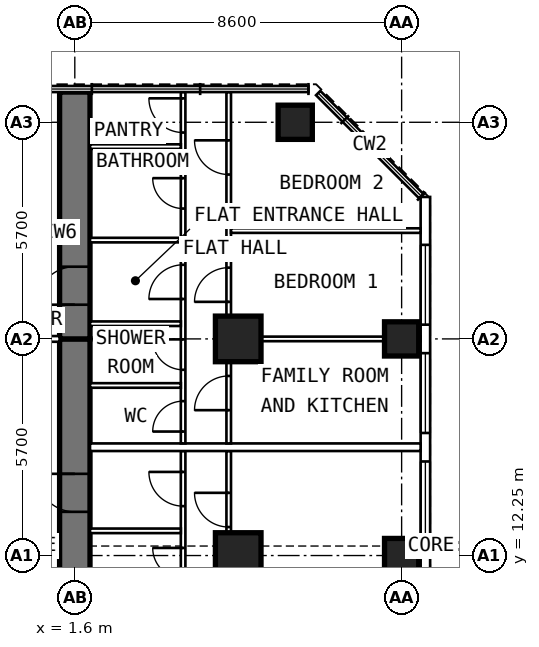
"""IFC4 building model, lengths in metres.
Left out: names, types, materials, properties, quantities, classifications, styles, units other than length and angle.
Written with IfcOpenShell. Run it as: python <this file> out.ifc"""

import sys

from ifc_helpers import new_model, si_unit, direction, frame, frame_2d, origin, origin_2d, place, context, subcontext, project, spatial, rectangle, extrude, element, fill, save


model = new_model("IFC4")
c1 = context("Model", 3, precision=1e-05, world=origin(), true_north=direction((0.0, 1.0)))
c2 = subcontext(c1, "Body", "Model", "MODEL_VIEW")
j1 = project(units=[si_unit("LENGTHUNIT", "METRE"), si_unit("PLANEANGLEUNIT", "RADIAN")], contexts=[c1])
p1 = place(None, origin())
s1 = spatial("IfcSite", under=j1, at=p1, CompositionType="ELEMENT")
p2 = place(p1, origin())
s2 = spatial("IfcBuilding", under=s1, at=p2, CompositionType="ELEMENT")
p3 = place(p2, frame((0.0, 0.0, 145.4)))
s3 = spatial("IfcBuildingStorey", under=s2, at=p3, CompositionType="ELEMENT", Elevation=145.4)
for number, where, z_axis, x_axis in (
    (1, (10.2, 12.25, 0.0), (0.0, 0.0, 1.0), (0.0, 1.0, 0.0)),
    (2, (10.2, 17.95, 0.0), (0.0, 0.0, 1.0), (0.0, 1.0, 0.0)),
    (3, (7.4, 23.65, 0.0), (0.0, 0.0, 1.0), (0.0, 1.0, 0.0)),
):
    element("IfcColumn", number, at=place(p3, frame(where, z_axis=z_axis, x_axis=x_axis)), inside=s3, PredefinedType="COLUMN", context=c2, shape_type="SweptSolid", body=[
        extrude(rectangle(XDim=0.9, YDim=0.9, at=origin_2d()), origin(), (0.0, 0.0, 1.0), 3.6),
    ])
for number, where, z_axis, x_axis in (
    (4, (5.9, 12.25, 0.0), (0.0, 0.0, 1.0), (0.0, 1.0, 0.0)),
    (5, (5.9, 17.95, 0.0), (0.0, 0.0, 1.0), (0.0, 1.0, 0.0)),
):
    element("IfcColumn", number, at=place(p3, frame(where, z_axis=z_axis, x_axis=x_axis)), inside=s3, PredefinedType="COLUMN", context=c2, shape_type="SweptSolid", body=[
        extrude(rectangle(XDim=1.2, YDim=1.2, at=origin_2d()), origin(), (0.0, 0.0, 1.0), 3.6),
    ])
p4 = place(p3, frame((1.6, 9.6, 0.0), z_axis=(0.0, 0.0, 1.0), x_axis=(0.0, 1.0, 0.0)))
e6 = element("IfcWall", 6, at=p4, inside=s3, PredefinedType="SHEAR", context=c2, shape_type="SweptSolid", body=[
    extrude(rectangle(XDim=8.35, YDim=0.8, at=frame_2d((4.175, 0.0))), origin(), (0.0, 0.0, 1.0), 3.6),
])
p5 = place(p4, frame((3.8, 0.0, 0.0)))
e7 = element("IfcOpeningElement", 7, at=p5, cuts=e6, PredefinedType="OPENING", context=c2, shape_type="SweptSolid", body=[
    extrude(rectangle(XDim=1.0, YDim=2.1, at=frame_2d((0.5, 1.05))), frame((0.0, 0.412, 0.0), z_axis=(0.0, -1.0, 0.0), x_axis=(1.0, 0.0, 0.0)), (0.0, 0.0, 1.0), 0.824),
])
p6 = place(p3, frame((1.6, 17.95, 0.0), z_axis=(0.0, 0.0, 1.0), x_axis=(0.0, 1.0, 0.0)))
e8 = element("IfcWall", 8, at=p6, inside=s3, PredefinedType="SHEAR", context=c2, shape_type="SweptSolid", body=[
    extrude(rectangle(XDim=6.495, YDim=0.8, at=frame_2d((3.248, 0.0))), origin(), (0.0, 0.0, 1.0), 3.6),
])
p7 = place(p6, frame((0.9, 0.0, 0.0)))
e9 = element("IfcOpeningElement", 9, at=p7, cuts=e8, PredefinedType="OPENING", context=c2, shape_type="SweptSolid", body=[
    extrude(rectangle(XDim=1.0, YDim=2.1, at=frame_2d((0.5, 1.05))), frame((0.0, 0.412, 0.0), z_axis=(0.0, -1.0, 0.0), x_axis=(1.0, 0.0, 0.0)), (0.0, 0.0, 1.0), 0.824),
])
p8 = place(p3, frame((10.825, 6.409, 0.0), z_axis=(0.0, 0.0, 1.0), x_axis=(0.0, 1.0, 0.0)))
e10 = element("IfcWall", 10, at=p8, inside=s3, PredefinedType="SOLIDWALL", context=c2, shape_type="SweptSolid", body=[
    extrude(rectangle(XDim=15.276, YDim=0.25, at=frame_2d((7.638, 0.0))), origin(), (0.0, 0.0, 1.0), 3.35),
])
p9 = place(p8, frame((0.516, 0.0, 0.8)))
e11 = element("IfcOpeningElement", 11, at=p9, cuts=e10, PredefinedType="OPENING", context=c2, shape_type="SweptSolid", body=[
    extrude(rectangle(XDim=2.1, YDim=1.8, at=frame_2d((1.05, 0.9))), frame((0.0, 0.137, 0.0), z_axis=(0.0, -1.0, 0.0), x_axis=(1.0, 0.0, 0.0)), (0.0, 0.0, 1.0), 0.274),
])
p10 = place(p8, frame((3.366, 0.0, 0.8)))
e12 = element("IfcOpeningElement", 12, at=p10, cuts=e10, PredefinedType="OPENING", context=c2, shape_type="SweptSolid", body=[
    extrude(rectangle(XDim=2.1, YDim=1.8, at=frame_2d((1.05, 0.9))), frame((0.0, 0.137, 0.0), z_axis=(0.0, -1.0, 0.0), x_axis=(1.0, 0.0, 0.0)), (0.0, 0.0, 1.0), 0.274),
])
p11 = place(p8, frame((6.216, 0.0, 0.8)))
e13 = element("IfcOpeningElement", 13, at=p11, cuts=e10, PredefinedType="OPENING", context=c2, shape_type="SweptSolid", body=[
    extrude(rectangle(XDim=2.1, YDim=1.8, at=frame_2d((1.05, 0.9))), frame((0.0, 0.137, 0.0), z_axis=(0.0, -1.0, 0.0), x_axis=(1.0, 0.0, 0.0)), (0.0, 0.0, 1.0), 0.274),
])
p12 = place(p8, frame((9.066, 0.0, 0.8)))
e14 = element("IfcOpeningElement", 14, at=p12, cuts=e10, PredefinedType="OPENING", context=c2, shape_type="SweptSolid", body=[
    extrude(rectangle(XDim=2.1, YDim=1.8, at=frame_2d((1.05, 0.9))), frame((0.0, 0.137, 0.0), z_axis=(0.0, -1.0, 0.0), x_axis=(1.0, 0.0, 0.0)), (0.0, 0.0, 1.0), 0.274),
])
p13 = place(p8, frame((11.916, 0.0, 0.8)))
e15 = element("IfcOpeningElement", 15, at=p13, cuts=e10, PredefinedType="OPENING", context=c2, shape_type="SweptSolid", body=[
    extrude(rectangle(XDim=2.1, YDim=1.8, at=frame_2d((1.05, 0.9))), frame((0.0, 0.137, 0.0), z_axis=(0.0, -1.0, 0.0), x_axis=(1.0, 0.0, 0.0)), (0.0, 0.0, 1.0), 0.274),
])
p14 = place(p3, frame((4.45, 10.05, 0.0), z_axis=(0.0, 0.0, 1.0), x_axis=(0.0, 1.0, 0.0)))
e16 = element("IfcWall", 16, at=p14, inside=s3, PredefinedType="PARTITIONING", context=c2, shape_type="SweptSolid", body=[
    extrude(rectangle(XDim=4.95, YDim=0.12, at=frame_2d((2.475, 0.0))), origin(), (0.0, 0.0, 1.0), 3.35),
])
p15 = place(p14, frame((1.6, 0.0, 0.0)))
e17 = element("IfcOpeningElement", 17, at=p15, cuts=e16, PredefinedType="OPENING", context=c2, shape_type="SweptSolid", body=[
    extrude(rectangle(XDim=0.8, YDim=2.1, at=frame_2d((0.4, 1.05))), frame((0.0, 0.072, 0.0), z_axis=(0.0, -1.0, 0.0), x_axis=(1.0, 0.0, 0.0)), (0.0, 0.0, 1.0), 0.144),
])
p16 = place(p14, frame((3.5, 0.0, 0.0)))
e18 = element("IfcOpeningElement", 18, at=p16, cuts=e16, PredefinedType="OPENING", context=c2, shape_type="SweptSolid", body=[
    extrude(rectangle(XDim=0.9, YDim=2.1, at=frame_2d((0.45, 1.05))), frame((0.0, 0.072, 0.0), z_axis=(0.0, -1.0, 0.0), x_axis=(1.0, 0.0, 0.0)), (0.0, 0.0, 1.0), 0.144),
])
p17 = place(p3, frame((5.65, 9.6, 0.0), z_axis=(0.0, 0.0, 1.0), x_axis=(0.0, 1.0, 0.0)))
e19 = element("IfcWall", 19, at=p17, inside=s3, PredefinedType="PARTITIONING", context=c2, shape_type="SweptSolid", body=[
    extrude(rectangle(XDim=5.4, YDim=0.12, at=frame_2d((2.7, 0.0))), origin(), (0.0, 0.0, 1.0), 3.35),
])
p18 = place(p17, frame((3.4, 0.0, 0.0)))
e20 = element("IfcOpeningElement", 20, at=p18, cuts=e19, PredefinedType="OPENING", context=c2, shape_type="SweptSolid", body=[
    extrude(rectangle(XDim=0.9, YDim=2.1, at=frame_2d((0.45, 1.05))), frame((0.0, 0.072, 0.0), z_axis=(0.0, -1.0, 0.0), x_axis=(1.0, 0.0, 0.0)), (0.0, 0.0, 1.0), 0.144),
])
p19 = place(p3, frame((2.0, 12.9, 0.0), z_axis=(0.0, 0.0, 1.0), x_axis=(1.0, 0.0, 0.0)))
e21 = element("IfcWall", 21, at=p19, inside=s3, PredefinedType="PARTITIONING", context=c2, shape_type="SweptSolid", body=[
    extrude(rectangle(XDim=2.39, YDim=0.12, at=frame_2d((1.195, 0.0))), origin(), (0.0, 0.0, 1.0), 3.35),
])
p20 = place(p3, frame((4.45, 15.2, 0.0), z_axis=(0.0, 0.0, 1.0), x_axis=(0.0, 1.0, 0.0)))
e22 = element("IfcWall", 22, at=p20, inside=s3, PredefinedType="PARTITIONING", context=c2, shape_type="SweptSolid", body=[
    extrude(rectangle(XDim=9.245, YDim=0.12, at=frame_2d((4.623, 0.0))), origin(), (0.0, 0.0, 1.0), 3.35),
])
p21 = place(p20, frame((0.312, 0.0, 0.0)))
e23 = element("IfcOpeningElement", 23, at=p21, cuts=e22, PredefinedType="OPENING", context=c2, shape_type="SweptSolid", body=[
    extrude(rectangle(XDim=0.8, YDim=2.1, at=frame_2d((0.4, 1.05))), frame((0.0, 0.072, 0.0), z_axis=(0.0, -1.0, 0.0), x_axis=(1.0, 0.0, 0.0)), (0.0, 0.0, 1.0), 0.144),
])
p22 = place(p20, frame((1.938, 0.0, 0.0)))
e24 = element("IfcOpeningElement", 24, at=p22, cuts=e22, PredefinedType="OPENING", context=c2, shape_type="SweptSolid", body=[
    extrude(rectangle(XDim=0.8, YDim=2.1, at=frame_2d((0.4, 1.05))), frame((0.0, 0.072, 0.0), z_axis=(0.0, -1.0, 0.0), x_axis=(1.0, 0.0, 0.0)), (0.0, 0.0, 1.0), 0.144),
])
p23 = place(p20, frame((3.8, 0.0, 0.0)))
e25 = element("IfcOpeningElement", 25, at=p23, cuts=e22, PredefinedType="OPENING", context=c2, shape_type="SweptSolid", body=[
    extrude(rectangle(XDim=0.9, YDim=2.1, at=frame_2d((0.45, 1.05))), frame((0.0, 0.072, 0.0), z_axis=(0.0, -1.0, 0.0), x_axis=(1.0, 0.0, 0.0)), (0.0, 0.0, 1.0), 0.144),
])
p24 = place(p20, frame((6.18, 0.0, 0.0)))
e26 = element("IfcOpeningElement", 26, at=p24, cuts=e22, PredefinedType="OPENING", context=c2, shape_type="SweptSolid", body=[
    extrude(rectangle(XDim=0.8, YDim=2.1, at=frame_2d((0.4, 1.05))), frame((0.0, 0.072, 0.0), z_axis=(0.0, -1.0, 0.0), x_axis=(1.0, 0.0, 0.0)), (0.0, 0.0, 1.0), 0.144),
])
p25 = place(p20, frame((8.18, 0.0, 0.0)))
e27 = element("IfcOpeningElement", 27, at=p25, cuts=e22, PredefinedType="OPENING", context=c2, shape_type="SweptSolid", body=[
    extrude(rectangle(XDim=0.9, YDim=2.1, at=frame_2d((0.45, 1.05))), frame((0.0, 0.072, 0.0), z_axis=(0.0, -1.0, 0.0), x_axis=(1.0, 0.0, 0.0)), (0.0, 0.0, 1.0), 0.144),
])
p26 = place(p3, frame((5.65, 15.2, 0.0), z_axis=(0.0, 0.0, 1.0), x_axis=(0.0, 1.0, 0.0)))
e28 = element("IfcWall", 28, at=p26, inside=s3, PredefinedType="PARTITIONING", context=c2, shape_type="SweptSolid", body=[
    extrude(rectangle(XDim=9.245, YDim=0.12, at=frame_2d((4.623, 0.0))), origin(), (0.0, 0.0, 1.0), 3.35),
])
p27 = place(p26, frame((0.875, 0.0, 0.0)))
e29 = element("IfcOpeningElement", 29, at=p27, cuts=e28, PredefinedType="OPENING", context=c2, shape_type="SweptSolid", body=[
    extrude(rectangle(XDim=0.9, YDim=2.1, at=frame_2d((0.45, 1.05))), frame((0.0, 0.072, 0.0), z_axis=(0.0, -1.0, 0.0), x_axis=(1.0, 0.0, 0.0)), (0.0, 0.0, 1.0), 0.144),
])
p28 = place(p26, frame((3.725, 0.0, 0.0)))
e30 = element("IfcOpeningElement", 30, at=p28, cuts=e28, PredefinedType="OPENING", context=c2, shape_type="SweptSolid", body=[
    extrude(rectangle(XDim=0.9, YDim=2.1, at=frame_2d((0.45, 1.05))), frame((0.0, 0.072, 0.0), z_axis=(0.0, -1.0, 0.0), x_axis=(1.0, 0.0, 0.0)), (0.0, 0.0, 1.0), 0.144),
])
p29 = place(p26, frame((7.075, 0.0, 0.0)))
e31 = element("IfcOpeningElement", 31, at=p29, cuts=e28, PredefinedType="OPENING", context=c2, shape_type="SweptSolid", body=[
    extrude(rectangle(XDim=0.9, YDim=2.1, at=frame_2d((0.45, 1.05))), frame((0.0, 0.072, 0.0), z_axis=(0.0, -1.0, 0.0), x_axis=(1.0, 0.0, 0.0)), (0.0, 0.0, 1.0), 0.144),
])
p30 = place(p3, frame((5.71, 17.95, 0.0), z_axis=(0.0, 0.0, 1.0), x_axis=(1.0, 0.0, 0.0)))
e32 = element("IfcWall", 32, at=p30, inside=s3, PredefinedType="PARTITIONING", context=c2, shape_type="SweptSolid", body=[
    extrude(rectangle(XDim=4.99, YDim=0.12, at=frame_2d((2.495, 0.0))), origin(), (0.0, 0.0, 1.0), 2.45),
])
p31 = place(p3, frame((5.71, 20.8, 0.0), z_axis=(0.0, 0.0, 1.0), x_axis=(1.0, 0.0, 0.0)))
e33 = element("IfcWall", 33, at=p31, inside=s3, PredefinedType="PARTITIONING", context=c2, shape_type="SweptSolid", body=[
    extrude(rectangle(XDim=4.99, YDim=0.12, at=frame_2d((2.495, 0.0))), origin(), (0.0, 0.0, 1.0), 3.35),
])
for number, where, z_axis, x_axis in (
    (34, (2.0, 16.725, 0.0), (0.0, 0.0, 1.0), (1.0, 0.0, 0.0)),
    (35, (2.0, 18.35, 0.0), (0.0, 0.0, 1.0), (1.0, 0.0, 0.0)),
    (36, (2.0, 20.55, 0.0), (0.0, 0.0, 1.0), (1.0, 0.0, 0.0)),
    (37, (2.0, 23.01, 0.0), (0.0, 0.0, 1.0), (1.0, 0.0, 0.0)),
):
    element("IfcWall", number, at=place(p3, frame(where, z_axis=z_axis, x_axis=x_axis)), inside=s3, PredefinedType="PARTITIONING", context=c2, shape_type="SweptSolid", body=[
        extrude(rectangle(XDim=2.39, YDim=0.12, at=frame_2d((1.195, 0.0))), origin(), (0.0, 0.0, 1.0), 3.35),
    ])
p32 = place(p3, frame((2.0, 15.1, 0.0), z_axis=(0.0, 0.0, 1.0), x_axis=(1.0, 0.0, 0.0)))
e38 = element("IfcWall", 38, at=p32, inside=s3, PredefinedType="PARTITIONING", context=c2, shape_type="SweptSolid", body=[
    extrude(rectangle(XDim=8.7, YDim=0.2, at=frame_2d((4.35, 0.0))), origin(), (0.0, 0.0, 1.0), 3.35),
])
p33 = place(p3, frame((1.2, 20.75, 0.0), z_axis=(0.0, 0.0, 1.0), x_axis=(-1.0, 0.0, 0.0)))
e39 = element("IfcWall", 39, at=p33, inside=s3, PredefinedType="PARTITIONING", context=c2, shape_type="SweptSolid", body=[
    extrude(rectangle(XDim=2.4, YDim=0.15, at=frame_2d((1.2, 0.0))), origin(), (0.0, 0.0, 1.0), 3.35),
])
p34 = place(p33, frame((0.7, 0.0, 0.0)))
e40 = element("IfcOpeningElement", 40, at=p34, cuts=e39, PredefinedType="OPENING", context=c2, shape_type="SweptSolid", body=[
    extrude(rectangle(XDim=1.0, YDim=2.1, at=frame_2d((0.5, 1.05))), frame((0.0, 0.087, 0.0), z_axis=(0.0, -1.0, 0.0), x_axis=(1.0, 0.0, 0.0)), (0.0, 0.0, 1.0), 0.174),
])
p35 = place(p3, frame((1.2, 17.95, 0.0), z_axis=(0.0, 0.0, 1.0), x_axis=(-1.0, 0.0, 0.0)))
e41 = element("IfcWall", 41, at=p35, inside=s3, PredefinedType="PARTITIONING", context=c2, shape_type="SweptSolid", body=[
    extrude(rectangle(XDim=2.4, YDim=0.15, at=frame_2d((1.2, 0.0))), origin(), (0.0, 0.0, 1.0), 3.35),
])
p36 = place(p35, frame((0.7, 0.0, 0.0)))
e42 = element("IfcOpeningElement", 42, at=p36, cuts=e41, PredefinedType="OPENING", context=c2, shape_type="SweptSolid", body=[
    extrude(rectangle(XDim=1.0, YDim=2.1, at=frame_2d((0.5, 1.05))), frame((0.0, 0.087, 0.0), z_axis=(0.0, -1.0, 0.0), x_axis=(1.0, 0.0, 0.0)), (0.0, 0.0, 1.0), 0.174),
])
p37 = place(p11, origin())
e43 = element("IfcWindow", 43, at=p37, inside=s3, PartitioningType="SINGLE_PANEL", PredefinedType="WINDOW", context=c2, shape_type="SweptSolid", body=[
    extrude(rectangle(XDim=2.1, YDim=1.8, at=frame_2d((1.05, 0.9))), frame((0.0, 0.03, 0.0), z_axis=(0.0, -1.0, 0.0), x_axis=(1.0, 0.0, 0.0)), (0.0, 0.0, 1.0), 0.06),
])
fill(e13, e43)
p38 = place(p12, origin())
e44 = element("IfcWindow", 44, at=p38, inside=s3, PartitioningType="SINGLE_PANEL", PredefinedType="WINDOW", context=c2, shape_type="SweptSolid", body=[
    extrude(rectangle(XDim=2.1, YDim=1.8, at=frame_2d((1.05, 0.9))), frame((0.0, 0.03, 0.0), z_axis=(0.0, -1.0, 0.0), x_axis=(1.0, 0.0, 0.0)), (0.0, 0.0, 1.0), 0.06),
])
fill(e14, e44)
p39 = place(p13, origin())
e45 = element("IfcWindow", 45, at=p39, inside=s3, PartitioningType="SINGLE_PANEL", PredefinedType="WINDOW", context=c2, shape_type="SweptSolid", body=[
    extrude(rectangle(XDim=2.1, YDim=1.8, at=frame_2d((1.05, 0.9))), frame((0.0, 0.03, 0.0), z_axis=(0.0, -1.0, 0.0), x_axis=(1.0, 0.0, 0.0)), (0.0, 0.0, 1.0), 0.06),
])
fill(e15, e45)
p40 = place(p5, origin())
e46 = element("IfcDoor", 46, at=p40, inside=s3, OperationType="SINGLE_SWING_RIGHT", PredefinedType="DOOR", context=c2, shape_type="SweptSolid", body=[
    extrude(rectangle(XDim=1.0, YDim=2.1, at=frame_2d((0.5, 1.05))), frame((0.0, 0.15, 0.0), z_axis=(0.0, -1.0, 0.0), x_axis=(1.0, 0.0, 0.0)), (0.0, 0.0, 1.0), 0.3),
])
fill(e7, e46)
p41 = place(p18, origin())
e47 = element("IfcDoor", 47, at=p41, inside=s3, OperationType="SINGLE_SWING_RIGHT", PredefinedType="DOOR", context=c2, shape_type="SweptSolid", body=[
    extrude(rectangle(XDim=0.9, YDim=2.1, at=frame_2d((0.45, 1.05))), frame((0.0, 0.025, 0.0), z_axis=(0.0, -1.0, 0.0), x_axis=(1.0, 0.0, 0.0)), (0.0, 0.0, 1.0), 0.05),
])
fill(e20, e47)
p42 = place(p15, origin())
e48 = element("IfcDoor", 48, at=p42, inside=s3, OperationType="SINGLE_SWING_RIGHT", PredefinedType="DOOR", context=c2, shape_type="SweptSolid", body=[
    extrude(rectangle(XDim=0.8, YDim=2.1, at=frame_2d((0.4, 1.05))), frame((0.0, 0.025, 0.0), z_axis=(0.0, -1.0, 0.0), x_axis=(1.0, 0.0, 0.0)), (0.0, 0.0, 1.0), 0.05),
])
fill(e17, e48)
p43 = place(p16, origin())
e49 = element("IfcDoor", 49, at=p43, inside=s3, OperationType="SINGLE_SWING_RIGHT", PredefinedType="DOOR", context=c2, shape_type="SweptSolid", body=[
    extrude(rectangle(XDim=0.9, YDim=2.1, at=frame_2d((0.45, 1.05))), frame((0.0, 0.025, 0.0), z_axis=(0.0, -1.0, 0.0), x_axis=(1.0, 0.0, 0.0)), (0.0, 0.0, 1.0), 0.05),
])
fill(e18, e49)
p44 = place(p7, origin())
e50 = element("IfcDoor", 50, at=p44, inside=s3, OperationType="SINGLE_SWING_LEFT", PredefinedType="DOOR", context=c2, shape_type="SweptSolid", body=[
    extrude(rectangle(XDim=1.0, YDim=2.1, at=frame_2d((0.5, 1.05))), frame((0.0, 0.15, 0.0), z_axis=(0.0, -1.0, 0.0), x_axis=(1.0, 0.0, 0.0)), (0.0, 0.0, 1.0), 0.3),
])
fill(e9, e50)
p45 = place(p27, origin())
e51 = element("IfcDoor", 51, at=p45, inside=s3, OperationType="SINGLE_SWING_LEFT", PredefinedType="DOOR", context=c2, shape_type="SweptSolid", body=[
    extrude(rectangle(XDim=0.9, YDim=2.1, at=frame_2d((0.45, 1.05))), frame((0.0, 0.025, 0.0), z_axis=(0.0, -1.0, 0.0), x_axis=(1.0, 0.0, 0.0)), (0.0, 0.0, 1.0), 0.05),
])
fill(e29, e51)
p46 = place(p28, origin())
e52 = element("IfcDoor", 52, at=p46, inside=s3, OperationType="SINGLE_SWING_LEFT", PredefinedType="DOOR", context=c2, shape_type="SweptSolid", body=[
    extrude(rectangle(XDim=0.9, YDim=2.1, at=frame_2d((0.45, 1.05))), frame((0.0, 0.025, 0.0), z_axis=(0.0, -1.0, 0.0), x_axis=(1.0, 0.0, 0.0)), (0.0, 0.0, 1.0), 0.05),
])
fill(e30, e52)
p47 = place(p29, origin())
e53 = element("IfcDoor", 53, at=p47, inside=s3, OperationType="SINGLE_SWING_RIGHT", PredefinedType="DOOR", context=c2, shape_type="SweptSolid", body=[
    extrude(rectangle(XDim=0.9, YDim=2.1, at=frame_2d((0.45, 1.05))), frame((0.0, 0.025, 0.0), z_axis=(0.0, -1.0, 0.0), x_axis=(1.0, 0.0, 0.0)), (0.0, 0.0, 1.0), 0.05),
])
fill(e31, e53)
p48 = place(p21, origin())
e54 = element("IfcDoor", 54, at=p48, inside=s3, OperationType="SINGLE_SWING_LEFT", PredefinedType="DOOR", context=c2, shape_type="SweptSolid", body=[
    extrude(rectangle(XDim=0.8, YDim=2.1, at=frame_2d((0.4, 1.05))), frame((0.0, 0.025, 0.0), z_axis=(0.0, -1.0, 0.0), x_axis=(1.0, 0.0, 0.0)), (0.0, 0.0, 1.0), 0.05),
])
fill(e23, e54)
p49 = place(p22, origin())
e55 = element("IfcDoor", 55, at=p49, inside=s3, OperationType="SINGLE_SWING_RIGHT", PredefinedType="DOOR", context=c2, shape_type="SweptSolid", body=[
    extrude(rectangle(XDim=0.8, YDim=2.1, at=frame_2d((0.4, 1.05))), frame((0.0, 0.025, 0.0), z_axis=(0.0, -1.0, 0.0), x_axis=(1.0, 0.0, 0.0)), (0.0, 0.0, 1.0), 0.05),
])
fill(e24, e55)
p50 = place(p23, origin())
e56 = element("IfcDoor", 56, at=p50, inside=s3, OperationType="SINGLE_SWING_LEFT", PredefinedType="DOOR", context=c2, shape_type="SweptSolid", body=[
    extrude(rectangle(XDim=0.9, YDim=2.1, at=frame_2d((0.45, 1.05))), frame((0.0, 0.025, 0.0), z_axis=(0.0, -1.0, 0.0), x_axis=(1.0, 0.0, 0.0)), (0.0, 0.0, 1.0), 0.05),
])
fill(e25, e56)
p51 = place(p24, origin())
e57 = element("IfcDoor", 57, at=p51, inside=s3, OperationType="SINGLE_SWING_RIGHT", PredefinedType="DOOR", context=c2, shape_type="SweptSolid", body=[
    extrude(rectangle(XDim=0.8, YDim=2.1, at=frame_2d((0.4, 1.05))), frame((0.0, 0.025, 0.0), z_axis=(0.0, -1.0, 0.0), x_axis=(1.0, 0.0, 0.0)), (0.0, 0.0, 1.0), 0.05),
])
fill(e26, e57)
p52 = place(p25, origin())
e58 = element("IfcDoor", 58, at=p52, inside=s3, OperationType="SINGLE_SWING_RIGHT", PredefinedType="DOOR", context=c2, shape_type="SweptSolid", body=[
    extrude(rectangle(XDim=0.9, YDim=2.1, at=frame_2d((0.45, 1.05))), frame((0.0, 0.025, 0.0), z_axis=(0.0, -1.0, 0.0), x_axis=(1.0, 0.0, 0.0)), (0.0, 0.0, 1.0), 0.05),
])
fill(e27, e58)
save(model, sys.argv[1])
